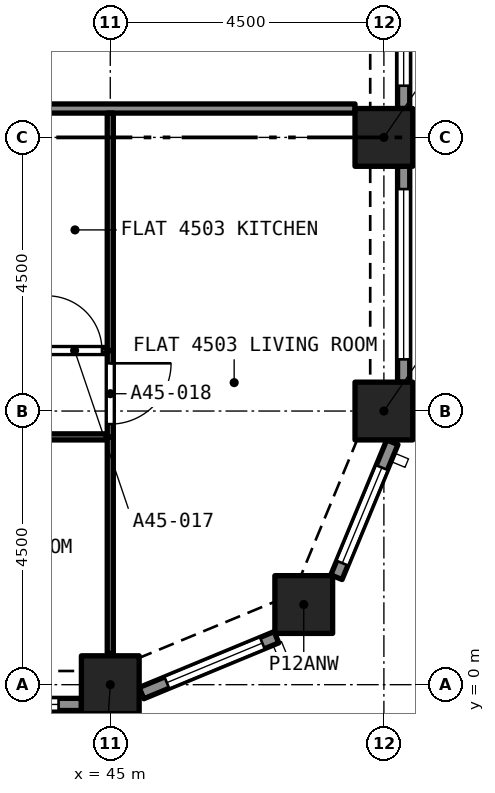
"""IFC4 building model, lengths in metres.
Left out: names, types, materials, properties, quantities, classifications, styles, units other than length and angle.
Written with IfcOpenShell. Run it as: python <this file> out.ifc"""

import sys

from ifc_helpers import new_model, si_unit, direction, frame, frame_2d, origin, origin_2d, place, context, subcontext, project, spatial, rectangle, extrude, element, fill, save


model = new_model("IFC4")
c1 = context("Model", 3, precision=1e-05, world=origin(), true_north=direction((0.0, 1.0)))
c2 = subcontext(c1, "Body", "Model", "MODEL_VIEW")
j1 = project(units=[si_unit("LENGTHUNIT", "METRE"), si_unit("PLANEANGLEUNIT", "RADIAN")], contexts=[c1])
p1 = place(None, origin())
s1 = spatial("IfcSite", under=j1, at=p1, CompositionType="ELEMENT")
p2 = place(p1, origin())
s2 = spatial("IfcBuilding", under=s1, at=p2, CompositionType="ELEMENT")
p3 = place(p2, frame((0.0, 0.0, 163.8)))
s3 = spatial("IfcBuildingStorey", under=s2, at=p3, CompositionType="ELEMENT", Elevation=163.8)
for number, where, z_axis, x_axis in (
    (1, (45.0, 0.0, 0.0), (0.0, 0.0, 1.0), (1.0, 0.0, 0.0)),
    (2, (48.182, 1.318, 0.0), (0.0, 0.0, 1.0), (1.0, 0.0, 0.0)),
    (3, (49.5, 4.5, 0.0), (0.0, 0.0, 1.0), (1.0, 0.0, 0.0)),
    (4, (49.5, 9.0, 0.0), (0.0, 0.0, 1.0), (1.0, 0.0, 0.0)),
):
    element("IfcColumn", number, at=place(p3, frame(where, z_axis=z_axis, x_axis=x_axis)), inside=s3, PredefinedType="COLUMN", context=c2, shape_type="SweptSolid", body=[
        extrude(rectangle(XDim=0.95, YDim=0.95, at=origin_2d()), origin(), (0.0, 0.0, 1.0), 4.4),
    ])
p4 = place(p3, frame((44.525, -0.325, 0.0), z_axis=(0.0, 0.0, 1.0), x_axis=(-1.0, 0.0, 0.0)))
e5 = element("IfcWall", 5, at=p4, inside=s3, PredefinedType="SOLIDWALL", context=c2, shape_type="SweptSolid", body=[
    extrude(rectangle(XDim=3.55, YDim=0.2, at=frame_2d((1.775, 0.0))), origin(), (0.0, 0.0, 1.0), 4.4),
])
p5 = place(p4, frame((0.375, 0.0, 0.45)))
e6 = element("IfcOpeningElement", 6, at=p5, cuts=e5, PredefinedType="OPENING", context=c2, shape_type="SweptSolid", body=[
    extrude(rectangle(XDim=2.8, YDim=2.55, at=frame_2d((1.4, 1.275))), frame((0.0, 0.11, 0.0), z_axis=(0.0, -1.0, 0.0), x_axis=(1.0, 0.0, 0.0)), (0.0, 0.0, 1.0), 0.22),
])
p6 = place(p3, frame((47.733, 0.78, 0.0), z_axis=(0.0, 0.0, 1.0), x_axis=(-0.923880599843, -0.382680855588, 0.0)))
e7 = element("IfcWall", 7, at=p6, inside=s3, PredefinedType="SOLIDWALL", context=c2, shape_type="SweptSolid", body=[
    extrude(rectangle(XDim=2.403, YDim=0.2, at=frame_2d((1.201, 0.0))), origin(), (0.0, 0.0, 1.0), 4.4),
])
p7 = place(p6, frame((0.251, 0.0, 0.45)))
e8 = element("IfcOpeningElement", 8, at=p7, cuts=e7, PredefinedType="OPENING", context=c2, shape_type="SweptSolid", body=[
    extrude(rectangle(XDim=1.7, YDim=2.55, at=frame_2d((0.85, 1.275))), frame((0.0, 0.11, 0.0), z_axis=(0.0, -1.0, 0.0), x_axis=(1.0, 0.0, 0.0)), (0.0, 0.0, 1.0), 0.22),
])
p8 = place(p3, frame((49.639, 3.987, 0.0), z_axis=(0.0, 0.0, 1.0), x_axis=(-0.382680855588, -0.923880599843, 0.0)))
e9 = element("IfcWall", 9, at=p8, inside=s3, PredefinedType="SOLIDWALL", context=c2, shape_type="SweptSolid", body=[
    extrude(rectangle(XDim=2.403, YDim=0.2, at=frame_2d((1.201, 0.0))), origin(), (0.0, 0.0, 1.0), 4.4),
])
p9 = place(p8, frame((0.451, 0.0, 0.45)))
e10 = element("IfcOpeningElement", 10, at=p9, cuts=e9, PredefinedType="OPENING", context=c2, shape_type="SweptSolid", body=[
    extrude(rectangle(XDim=1.7, YDim=2.55, at=frame_2d((0.85, 1.275))), frame((0.0, 0.11, 0.0), z_axis=(0.0, -1.0, 0.0), x_axis=(1.0, 0.0, 0.0)), (0.0, 0.0, 1.0), 0.22),
])
p10 = place(p3, frame((49.825, 8.525, 0.0), z_axis=(0.0, 0.0, 1.0), x_axis=(0.0, -1.0, 0.0)))
e11 = element("IfcWall", 11, at=p10, inside=s3, PredefinedType="SOLIDWALL", context=c2, shape_type="SweptSolid", body=[
    extrude(rectangle(XDim=3.55, YDim=0.2, at=frame_2d((1.775, 0.0))), origin(), (0.0, 0.0, 1.0), 4.4),
])
p11 = place(p10, frame((0.375, 0.0, 0.45)))
e12 = element("IfcOpeningElement", 12, at=p11, cuts=e11, PredefinedType="OPENING", context=c2, shape_type="SweptSolid", body=[
    extrude(rectangle(XDim=2.8, YDim=2.55, at=frame_2d((1.4, 1.275))), frame((0.0, 0.11, 0.0), z_axis=(0.0, -1.0, 0.0), x_axis=(1.0, 0.0, 0.0)), (0.0, 0.0, 1.0), 0.22),
])
p12 = place(p3, frame((49.825, 13.025, 0.0), z_axis=(0.0, 0.0, 1.0), x_axis=(0.0, -1.0, 0.0)))
e13 = element("IfcWall", 13, at=p12, inside=s3, PredefinedType="SOLIDWALL", context=c2, shape_type="SweptSolid", body=[
    extrude(rectangle(XDim=3.55, YDim=0.2, at=frame_2d((1.775, 0.0))), origin(), (0.0, 0.0, 1.0), 4.4),
])
p13 = place(p12, frame((0.375, 0.0, 0.45)))
e14 = element("IfcOpeningElement", 14, at=p13, cuts=e13, PredefinedType="OPENING", context=c2, shape_type="SweptSolid", body=[
    extrude(rectangle(XDim=2.8, YDim=2.55, at=frame_2d((1.4, 1.275))), frame((0.0, 0.11, 0.0), z_axis=(0.0, -1.0, 0.0), x_axis=(1.0, 0.0, 0.0)), (0.0, 0.0, 1.0), 0.22),
])
p14 = place(p3, frame((42.85, 9.475, 0.0), z_axis=(0.0, 0.0, 1.0), x_axis=(1.0, 0.0, 0.0)))
e15 = element("IfcWall", 15, at=p14, inside=s3, PredefinedType="PARTITIONING", context=c2, shape_type="SweptSolid", body=[
    extrude(rectangle(XDim=6.175, YDim=0.15, at=frame_2d((3.087, 0.0))), origin(), (0.0, 0.0, 1.0), 4.1),
])
p15 = place(p3, frame((44.95, 4.075, 0.0), z_axis=(0.0, 0.0, 1.0), x_axis=(-1.0, 0.0, 0.0)))
e16 = element("IfcWall", 16, at=p15, inside=s3, PredefinedType="PARTITIONING", context=c2, shape_type="SweptSolid", body=[
    extrude(rectangle(XDim=4.35, YDim=0.1, at=frame_2d((2.175, 0.0))), origin(), (0.0, 0.0, 1.0), 4.1),
])
p16 = place(p15, frame((1.75, 0.0, 0.0)))
e17 = element("IfcOpeningElement", 17, at=p16, cuts=e16, PredefinedType="OPENING", context=c2, shape_type="SweptSolid", body=[
    extrude(rectangle(XDim=0.9, YDim=2.1, at=frame_2d((0.45, 1.05))), frame((0.0, 0.06, 0.0), z_axis=(0.0, -1.0, 0.0), x_axis=(1.0, 0.0, 0.0)), (0.0, 0.0, 1.0), 0.12),
])
p17 = place(p3, frame((45.0, 0.514, 0.0), z_axis=(0.0, 0.0, 1.0), x_axis=(0.0, 1.0, 0.0)))
e18 = element("IfcWall", 18, at=p17, inside=s3, PredefinedType="PARTITIONING", context=c2, shape_type="SweptSolid", body=[
    extrude(rectangle(XDim=3.561, YDim=0.1, at=frame_2d((1.78, 0.0))), origin(), (0.0, 0.0, 1.0), 4.1),
])
p18 = place(p3, frame((43.827, 5.495, 0.0), z_axis=(0.0, 0.0, 1.0), x_axis=(1.0, 0.0, 0.0)))
e19 = element("IfcWall", 19, at=p18, inside=s3, PredefinedType="PARTITIONING", context=c2, shape_type="SweptSolid", body=[
    extrude(rectangle(XDim=1.123, YDim=0.1, at=frame_2d((0.561, 0.0))), origin(), (0.0, 0.0, 1.0), 4.1),
])
p19 = place(p18, frame((0.136, 0.0, 0.0)))
e20 = element("IfcOpeningElement", 20, at=p19, cuts=e19, PredefinedType="OPENING", context=c2, shape_type="SweptSolid", body=[
    extrude(rectangle(XDim=0.9, YDim=2.1, at=frame_2d((0.45, 1.05))), frame((0.0, 0.06, 0.0), z_axis=(0.0, -1.0, 0.0), x_axis=(1.0, 0.0, 0.0)), (0.0, 0.0, 1.0), 0.12),
])
p20 = place(p3, frame((45.0, 5.495, 0.0), z_axis=(0.0, 0.0, 1.0), x_axis=(0.0, -1.0, 0.0)))
e21 = element("IfcWall", 21, at=p20, inside=s3, PredefinedType="PARTITIONING", context=c2, shape_type="SweptSolid", body=[
    extrude(rectangle(XDim=1.42, YDim=0.1, at=frame_2d((0.71, 0.0))), origin(), (0.0, 0.0, 1.0), 4.1),
])
p21 = place(p20, frame((0.21, 0.0, 0.0)))
e22 = element("IfcOpeningElement", 22, at=p21, cuts=e21, PredefinedType="OPENING", context=c2, shape_type="SweptSolid", body=[
    extrude(rectangle(XDim=1.0, YDim=2.1, at=frame_2d((0.5, 1.05))), frame((0.0, 0.06, 0.0), z_axis=(0.0, -1.0, 0.0), x_axis=(1.0, 0.0, 0.0)), (0.0, 0.0, 1.0), 0.12),
])
p22 = place(p3, frame((45.0, 5.495, 0.0), z_axis=(0.0, 0.0, 1.0), x_axis=(0.0, 1.0, 0.0)))
e23 = element("IfcWall", 23, at=p22, inside=s3, PredefinedType="PARTITIONING", context=c2, shape_type="SweptSolid", body=[
    extrude(rectangle(XDim=3.905, YDim=0.1, at=frame_2d((1.952, 0.0))), origin(), (0.0, 0.0, 1.0), 4.1),
])
p23 = place(p5, origin())
e24 = element("IfcWindow", 24, at=p23, inside=s3, PartitioningType="SINGLE_PANEL", PredefinedType="WINDOW", context=c2, shape_type="SweptSolid", body=[
    extrude(rectangle(XDim=2.8, YDim=2.55, at=frame_2d((1.4, 1.275))), frame((0.0, 0.03, 0.0), z_axis=(0.0, -1.0, 0.0), x_axis=(1.0, 0.0, 0.0)), (0.0, 0.0, 1.0), 0.06),
])
fill(e6, e24)
p24 = place(p7, origin())
e25 = element("IfcWindow", 25, at=p24, inside=s3, PartitioningType="SINGLE_PANEL", PredefinedType="WINDOW", context=c2, shape_type="SweptSolid", body=[
    extrude(rectangle(XDim=1.7, YDim=2.55, at=frame_2d((0.85, 1.275))), frame((0.0, 0.03, 0.0), z_axis=(0.0, -1.0, 0.0), x_axis=(1.0, 0.0, 0.0)), (0.0, 0.0, 1.0), 0.06),
])
fill(e8, e25)
p25 = place(p9, origin())
e26 = element("IfcWindow", 26, at=p25, inside=s3, PartitioningType="SINGLE_PANEL", PredefinedType="WINDOW", context=c2, shape_type="SweptSolid", body=[
    extrude(rectangle(XDim=1.7, YDim=2.55, at=frame_2d((0.85, 1.275))), frame((0.0, 0.03, 0.0), z_axis=(0.0, -1.0, 0.0), x_axis=(1.0, 0.0, 0.0)), (0.0, 0.0, 1.0), 0.06),
])
fill(e10, e26)
p26 = place(p11, origin())
e27 = element("IfcWindow", 27, at=p26, inside=s3, PartitioningType="SINGLE_PANEL", PredefinedType="WINDOW", context=c2, shape_type="SweptSolid", body=[
    extrude(rectangle(XDim=2.8, YDim=2.55, at=frame_2d((1.4, 1.275))), frame((0.0, 0.03, 0.0), z_axis=(0.0, -1.0, 0.0), x_axis=(1.0, 0.0, 0.0)), (0.0, 0.0, 1.0), 0.06),
])
fill(e12, e27)
p27 = place(p13, origin())
e28 = element("IfcWindow", 28, at=p27, inside=s3, PartitioningType="SINGLE_PANEL", PredefinedType="WINDOW", context=c2, shape_type="SweptSolid", body=[
    extrude(rectangle(XDim=2.8, YDim=2.55, at=frame_2d((1.4, 1.275))), frame((0.0, 0.03, 0.0), z_axis=(0.0, -1.0, 0.0), x_axis=(1.0, 0.0, 0.0)), (0.0, 0.0, 1.0), 0.06),
])
fill(e14, e28)
p28 = place(p19, origin())
e29 = element("IfcDoor", 29, at=p28, inside=s3, OperationType="SINGLE_SWING_RIGHT", PredefinedType="DOOR", context=c2, shape_type="SweptSolid", body=[
    extrude(rectangle(XDim=0.9, YDim=2.1, at=frame_2d((0.45, 1.05))), frame((0.0, 0.025, 0.0), z_axis=(0.0, -1.0, 0.0), x_axis=(1.0, 0.0, 0.0)), (0.0, 0.0, 1.0), 0.05),
])
fill(e20, e29)
p29 = place(p21, origin())
e30 = element("IfcDoor", 30, at=p29, inside=s3, OperationType="SINGLE_SWING_RIGHT", PredefinedType="DOOR", context=c2, shape_type="SweptSolid", body=[
    extrude(rectangle(XDim=1.0, YDim=2.1, at=frame_2d((0.5, 1.05))), frame((0.0, 0.025, 0.0), z_axis=(0.0, -1.0, 0.0), x_axis=(1.0, 0.0, 0.0)), (0.0, 0.0, 1.0), 0.05),
])
fill(e22, e30)
save(model, sys.argv[1])
